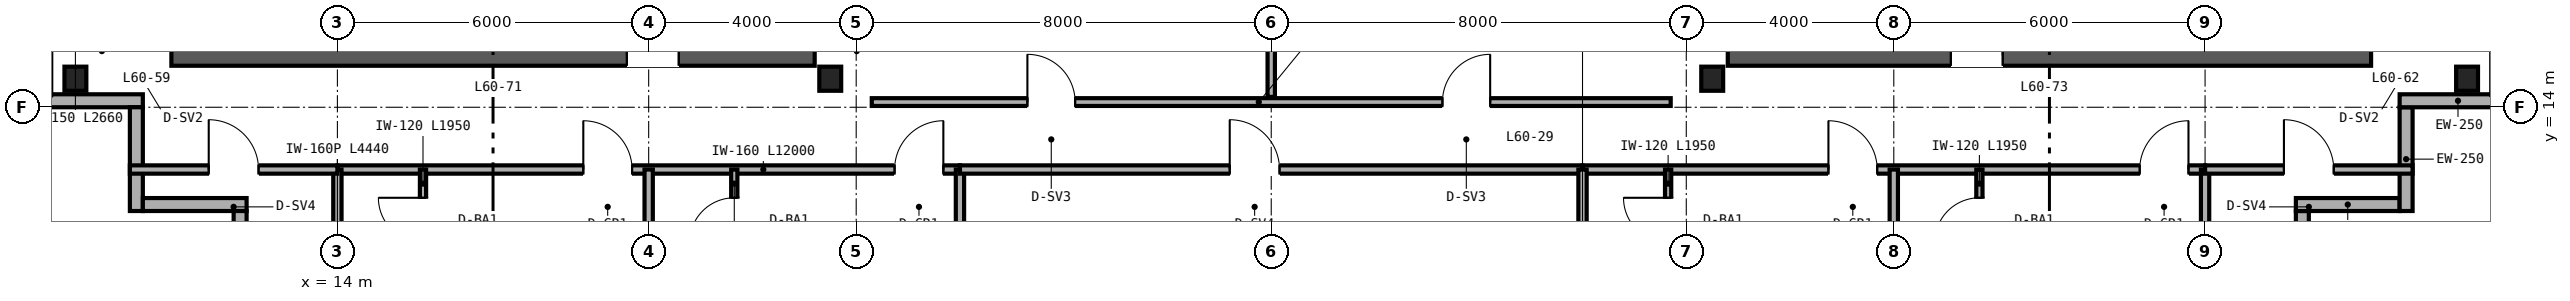
"""IFC4 building model, lengths in metres.
Left out: names, types, materials, properties, quantities, classifications, styles, units other than length and angle.
Written with IfcOpenShell. Run it as: python <this file> out.ifc"""

import sys

from ifc_helpers import new_model, si_unit, direction, frame, frame_2d, origin, origin_2d, place, context, subcontext, project, spatial, rectangle, i_section, extrude, source, transform, mapped, element, fill, save


model = new_model("IFC4")
c1 = context("Model", 3, precision=1e-05, world=origin(), true_north=direction((0.0, 1.0)))
c2 = subcontext(c1, "Body", "Model", "MODEL_VIEW")
j1 = project(units=[si_unit("LENGTHUNIT", "METRE"), si_unit("PLANEANGLEUNIT", "RADIAN")], contexts=[c1])
p1 = place(None, origin())
s1 = spatial("IfcSite", under=j1, at=p1, CompositionType="ELEMENT")
p2 = place(p1, origin())
s2 = spatial("IfcBuilding", under=s1, at=p2, CompositionType="ELEMENT")
p3 = place(p2, frame((0.0, 0.0, 240.0)))
s3 = spatial("IfcBuildingStorey", under=s2, at=p3, CompositionType="ELEMENT", Elevation=240.0)
p4 = place(p3, frame((10.8, 15.0, 0.0), z_axis=(0.0, 0.0, 1.0), x_axis=(1.0, 0.0, 0.0)))
e1 = element("IfcWall", 1, at=p4, inside=s3, PredefinedType="SHEAR", context=c2, shape_type="SweptSolid", body=[
    extrude(rectangle(XDim=12.4, YDim=0.4, at=frame_2d((6.2, 0.0))), origin(), (0.0, 0.0, 1.0), 3.38),
])
p5 = place(p4, frame((8.78, 0.0, 0.0)))
e2 = element("IfcOpeningElement", 2, at=p5, cuts=e1, PredefinedType="OPENING", context=c2, shape_type="SweptSolid", body=[
    extrude(rectangle(XDim=1.0, YDim=2.15, at=frame_2d((0.5, 1.075))), frame((0.0, 0.21, 0.0), z_axis=(0.0, -1.0, 0.0), x_axis=(1.0, 0.0, 0.0)), (0.0, 0.0, 1.0), 0.42),
])
p6 = place(p3, frame((40.8, 15.0, 0.0), z_axis=(0.0, 0.0, 1.0), x_axis=(1.0, 0.0, 0.0)))
e3 = element("IfcWall", 3, at=p6, inside=s3, PredefinedType="SHEAR", context=c2, shape_type="SweptSolid", body=[
    extrude(rectangle(XDim=12.4, YDim=0.4, at=frame_2d((6.2, 0.0))), origin(), (0.0, 0.0, 1.0), 3.38),
])
p7 = place(p6, frame((4.3, 0.0, 0.0)))
e4 = element("IfcOpeningElement", 4, at=p7, cuts=e3, PredefinedType="OPENING", context=c2, shape_type="SweptSolid", body=[
    extrude(rectangle(XDim=1.0, YDim=2.15, at=frame_2d((0.5, 1.075))), frame((0.0, 0.21, 0.0), z_axis=(0.0, -1.0, 0.0), x_axis=(1.0, 0.0, 0.0)), (0.0, 0.0, 1.0), 0.42),
])
m1 = source(origin(), c2, "Body", "SweptSolid", [
    extrude(i_section(OverallWidth=0.422, OverallDepth=0.465, WebThickness=0.045, FlangeThickness=0.073, FilletRadius=0.025, at=origin_2d()), origin(), (0.0, 0.0, 1.0), 3.38),
])
for number, where, z_axis, x_axis in (
    (5, (8.95, 14.55, 0.0), (0.0, 0.0, 1.0), (1.0, 0.0, 0.0)),
    (6, (23.5, 14.55, 0.0), (0.0, 0.0, 1.0), (1.0, 0.0, 0.0)),
    (7, (40.5, 14.55, 0.0), (0.0, 0.0, 1.0), (1.0, 0.0, 0.0)),
    (8, (55.05, 14.55, 0.0), (0.0, 0.0, 1.0), (1.0, 0.0, 0.0)),
):
    element("IfcColumn", number, at=place(p3, frame(where, z_axis=z_axis, x_axis=x_axis)), inside=s3, PredefinedType="COLUMN", context=c2, shape_type="MappedRepresentation", body=[
        mapped(m1, transform((0.0, 0.0, 0.0), scale=1.0)),
    ])
p8 = place(p3, frame((51.875, 10.0, 0.0), z_axis=(0.0, 0.0, 1.0), x_axis=(0.0, 1.0, 0.0)))
e9 = element("IfcWall", 9, at=p8, inside=s3, PredefinedType="SOLIDWALL", context=c2, shape_type="SweptSolid", body=[
    extrude(rectangle(XDim=2.0, YDim=0.25, at=frame_2d((1.0, 0.0))), origin(), (0.0, 0.0, 1.0), 3.38),
])
p9 = place(p8, frame((0.5, 0.0, 0.85)))
e10 = element("IfcOpeningElement", 10, at=p9, cuts=e9, PredefinedType="OPENING", context=c2, shape_type="SweptSolid", body=[
    extrude(rectangle(XDim=1.0, YDim=1.9, at=frame_2d((0.5, 0.95))), frame((0.0, 0.135, 0.0), z_axis=(0.0, -1.0, 0.0), x_axis=(1.0, 0.0, 0.0)), (0.0, 0.0, 1.0), 0.27),
])
for number, where, z_axis, x_axis in (
    (11, (51.75, 12.125, 0.0), (0.0, 0.0, 1.0), (1.0, 0.0, 0.0)),
    (12, (53.875, 12.0, 0.0), (0.0, 0.0, 1.0), (0.0, 1.0, 0.0)),
):
    element("IfcWall", number, at=place(p3, frame(where, z_axis=z_axis, x_axis=x_axis)), inside=s3, PredefinedType="SOLIDWALL", context=c2, shape_type="SweptSolid", body=[
        extrude(rectangle(XDim=2.0, YDim=0.25, at=frame_2d((1.0, 0.0))), origin(), (0.0, 0.0, 1.0), 3.38),
    ])
for number, where, z_axis, x_axis in (
    (13, (53.75, 14.125, 0.0), (0.0, 0.0, 1.0), (1.0, 0.0, 0.0)),
    (14, (8.0, 14.125, 0.0), (0.0, 0.0, 1.0), (1.0, 0.0, 0.0)),
):
    element("IfcWall", number, at=place(p3, frame(where, z_axis=z_axis, x_axis=x_axis)), inside=s3, PredefinedType="SOLIDWALL", context=c2, shape_type="SweptSolid", body=[
        extrude(rectangle(XDim=2.25, YDim=0.25, at=frame_2d((1.125, 0.0))), origin(), (0.0, 0.0, 1.0), 3.38),
    ])
for number, where, z_axis, x_axis in (
    (15, (10.125, 14.0, 0.0), (0.0, 0.0, 1.0), (0.0, -1.0, 0.0)),
    (16, (10.25, 12.125, 0.0), (0.0, 0.0, 1.0), (1.0, 0.0, 0.0)),
    (17, (12.125, 12.0, 0.0), (0.0, 0.0, 1.0), (0.0, -1.0, 0.0)),
):
    element("IfcWall", number, at=place(p3, frame(where, z_axis=z_axis, x_axis=x_axis)), inside=s3, PredefinedType="SOLIDWALL", context=c2, shape_type="SweptSolid", body=[
        extrude(rectangle(XDim=2.0, YDim=0.25, at=frame_2d((1.0, 0.0))), origin(), (0.0, 0.0, 1.0), 3.38),
    ])
p10 = place(p3, frame((32.0, 14.2, 0.0), z_axis=(0.0, 0.0, 1.0), x_axis=(0.0, 1.0, 0.0)))
e18 = element("IfcWall", 18, at=p10, inside=s3, PredefinedType="PARTITIONING", context=c2, shape_type="SweptSolid", body=[
    extrude(rectangle(XDim=2.65, YDim=0.142, at=frame_2d((1.325, 0.0))), origin(), (0.0, 0.0, 1.0), 3.38),
])
p11 = place(p3, frame((24.3, 14.1, 0.0), z_axis=(0.0, 0.0, 1.0), x_axis=(1.0, 0.0, 0.0)))
e19 = element("IfcWall", 19, at=p11, inside=s3, PredefinedType="PARTITIONING", context=c2, shape_type="SweptSolid", body=[
    extrude(rectangle(XDim=15.4, YDim=0.15, at=frame_2d((7.7, 0.0))), origin(), (0.0, 0.0, 1.0), 3.38),
])
p12 = place(p11, frame((3.0, 0.0, 0.0)))
e20 = element("IfcOpeningElement", 20, at=p12, cuts=e19, PredefinedType="OPENING", context=c2, shape_type="SweptSolid", body=[
    extrude(rectangle(XDim=0.92, YDim=2.15, at=frame_2d((0.46, 1.075))), frame((0.0, 0.085, 0.0), z_axis=(0.0, -1.0, 0.0), x_axis=(1.0, 0.0, 0.0)), (0.0, 0.0, 1.0), 0.17),
])
p13 = place(p11, frame((11.0, 0.0, 0.0)))
e21 = element("IfcOpeningElement", 21, at=p13, cuts=e19, PredefinedType="OPENING", context=c2, shape_type="SweptSolid", body=[
    extrude(rectangle(XDim=0.92, YDim=2.15, at=frame_2d((0.46, 1.075))), frame((0.0, 0.085, 0.0), z_axis=(0.0, -1.0, 0.0), x_axis=(1.0, 0.0, 0.0)), (0.0, 0.0, 1.0), 0.17),
])
p14 = place(p3, frame((14.0, 12.8, 0.0), z_axis=(0.0, 0.0, 1.0), x_axis=(1.0, 0.0, 0.0)))
e22 = element("IfcWall", 22, at=p14, inside=s3, PredefinedType="PARTITIONING", context=c2, shape_type="SweptSolid", body=[
    extrude(rectangle(XDim=12.0, YDim=0.16, at=frame_2d((6.0, 0.0))), origin(), (0.0, 0.0, 1.0), 2.923),
])
p15 = place(p14, frame((4.74, 0.0, 0.0)))
e23 = element("IfcOpeningElement", 23, at=p15, cuts=e22, PredefinedType="OPENING", context=c2, shape_type="SweptSolid", body=[
    extrude(rectangle(XDim=0.94, YDim=2.15, at=frame_2d((0.47, 1.075))), frame((0.0, 0.09, 0.0), z_axis=(0.0, -1.0, 0.0), x_axis=(1.0, 0.0, 0.0)), (0.0, 0.0, 1.0), 0.18),
])
p16 = place(p14, frame((10.74, 0.0, 0.0)))
e24 = element("IfcOpeningElement", 24, at=p16, cuts=e22, PredefinedType="OPENING", context=c2, shape_type="SweptSolid", body=[
    extrude(rectangle(XDim=0.94, YDim=2.15, at=frame_2d((0.47, 1.075))), frame((0.0, 0.09, 0.0), z_axis=(0.0, -1.0, 0.0), x_axis=(1.0, 0.0, 0.0)), (0.0, 0.0, 1.0), 0.18),
])
p17 = place(p3, frame((14.0, 8.36, 0.0), z_axis=(0.0, 0.0, 1.0), x_axis=(0.0, 1.0, 0.0)))
e25 = element("IfcWall", 25, at=p17, inside=s3, PredefinedType="PARTITIONING", context=c2, shape_type="SweptSolid", body=[
    extrude(rectangle(XDim=4.44, YDim=0.16, at=frame_2d((2.22, 0.0))), origin(), (0.0, 0.0, 1.0), 2.687),
])
p18 = place(p3, frame((26.0, 8.36, 0.0), z_axis=(0.0, 0.0, 1.0), x_axis=(0.0, 1.0, 0.0)))
e26 = element("IfcWall", 26, at=p18, inside=s3, PredefinedType="PARTITIONING", context=c2, shape_type="SweptSolid", body=[
    extrude(rectangle(XDim=4.44, YDim=0.16, at=frame_2d((2.22, 0.0))), origin(), (0.0, 0.0, 1.0), 2.453),
])
p19 = place(p3, frame((20.0, 8.36, 0.0), z_axis=(0.0, 0.0, 1.0), x_axis=(0.0, 1.0, 0.0)))
e27 = element("IfcWall", 27, at=p19, inside=s3, PredefinedType="PARTITIONING", context=c2, shape_type="SweptSolid", body=[
    extrude(rectangle(XDim=4.44, YDim=0.16, at=frame_2d((2.22, 0.0))), origin(), (0.0, 0.0, 1.0), 2.687),
])
p20 = place(p3, frame((15.65, 10.85, 0.0), z_axis=(0.0, 0.0, 1.0), x_axis=(0.0, 1.0, 0.0)))
e28 = element("IfcWall", 28, at=p20, inside=s3, PredefinedType="PARTITIONING", context=c2, shape_type="SweptSolid", body=[
    extrude(rectangle(XDim=1.95, YDim=0.12, at=frame_2d((0.975, 0.0))), origin(), (0.0, 0.0, 1.0), 3.38),
])
p21 = place(p20, frame((0.545, 0.0, 0.0)))
e29 = element("IfcOpeningElement", 29, at=p21, cuts=e28, PredefinedType="OPENING", context=c2, shape_type="SweptSolid", body=[
    extrude(rectangle(XDim=0.86, YDim=2.1, at=frame_2d((0.43, 1.05))), frame((0.0, 0.07, 0.0), z_axis=(0.0, -1.0, 0.0), x_axis=(1.0, 0.0, 0.0)), (0.0, 0.0, 1.0), 0.14),
])
p22 = place(p3, frame((21.65, 10.85, 0.0), z_axis=(0.0, 0.0, 1.0), x_axis=(0.0, 1.0, 0.0)))
e30 = element("IfcWall", 30, at=p22, inside=s3, PredefinedType="PARTITIONING", context=c2, shape_type="SweptSolid", body=[
    extrude(rectangle(XDim=1.95, YDim=0.12, at=frame_2d((0.975, 0.0))), origin(), (0.0, 0.0, 1.0), 3.38),
])
p23 = place(p22, frame((0.545, 0.0, 0.0)))
e31 = element("IfcOpeningElement", 31, at=p23, cuts=e30, PredefinedType="OPENING", context=c2, shape_type="SweptSolid", body=[
    extrude(rectangle(XDim=0.86, YDim=2.1, at=frame_2d((0.43, 1.05))), frame((0.0, 0.07, 0.0), z_axis=(0.0, -1.0, 0.0), x_axis=(1.0, 0.0, 0.0)), (0.0, 0.0, 1.0), 0.14),
])
p24 = place(p3, frame((26.0, 12.8, 0.0), z_axis=(0.0, 0.0, 1.0), x_axis=(1.0, 0.0, 0.0)))
e32 = element("IfcWall", 32, at=p24, inside=s3, PredefinedType="PARTITIONING", context=c2, shape_type="SweptSolid", body=[
    extrude(rectangle(XDim=12.0, YDim=0.16, at=frame_2d((6.0, 0.0))), origin(), (0.0, 0.0, 1.0), 3.38),
])
p25 = place(p24, frame((5.2, 0.0, 0.0)))
e33 = element("IfcOpeningElement", 33, at=p25, cuts=e32, PredefinedType="OPENING", context=c2, shape_type="SweptSolid", body=[
    extrude(rectangle(XDim=0.96, YDim=2.15, at=frame_2d((0.48, 1.075))), frame((0.0, 0.09, 0.0), z_axis=(0.0, -1.0, 0.0), x_axis=(1.0, 0.0, 0.0)), (0.0, 0.0, 1.0), 0.18),
])
p26 = place(p3, frame((38.0, 12.8, 0.0), z_axis=(0.0, 0.0, 1.0), x_axis=(1.0, 0.0, 0.0)))
e34 = element("IfcWall", 34, at=p26, inside=s3, PredefinedType="PARTITIONING", context=c2, shape_type="SweptSolid", body=[
    extrude(rectangle(XDim=12.0, YDim=0.16, at=frame_2d((6.0, 0.0))), origin(), (0.0, 0.0, 1.0), 2.923),
])
p27 = place(p26, frame((4.74, 0.0, 0.0)))
e35 = element("IfcOpeningElement", 35, at=p27, cuts=e34, PredefinedType="OPENING", context=c2, shape_type="SweptSolid", body=[
    extrude(rectangle(XDim=0.94, YDim=2.15, at=frame_2d((0.47, 1.075))), frame((0.0, 0.09, 0.0), z_axis=(0.0, -1.0, 0.0), x_axis=(1.0, 0.0, 0.0)), (0.0, 0.0, 1.0), 0.18),
])
p28 = place(p26, frame((10.74, 0.0, 0.0)))
e36 = element("IfcOpeningElement", 36, at=p28, cuts=e34, PredefinedType="OPENING", context=c2, shape_type="SweptSolid", body=[
    extrude(rectangle(XDim=0.94, YDim=2.15, at=frame_2d((0.47, 1.075))), frame((0.0, 0.09, 0.0), z_axis=(0.0, -1.0, 0.0), x_axis=(1.0, 0.0, 0.0)), (0.0, 0.0, 1.0), 0.18),
])
p29 = place(p3, frame((38.0, 8.36, 0.0), z_axis=(0.0, 0.0, 1.0), x_axis=(0.0, 1.0, 0.0)))
e37 = element("IfcWall", 37, at=p29, inside=s3, PredefinedType="PARTITIONING", context=c2, shape_type="SweptSolid", body=[
    extrude(rectangle(XDim=4.44, YDim=0.16, at=frame_2d((2.22, 0.0))), origin(), (0.0, 0.0, 1.0), 2.453),
])
for number, where, z_axis, x_axis in (
    (38, (50.0, 8.36, 0.0), (0.0, 0.0, 1.0), (0.0, 1.0, 0.0)),
    (39, (44.0, 8.36, 0.0), (0.0, 0.0, 1.0), (0.0, 1.0, 0.0)),
):
    element("IfcWall", number, at=place(p3, frame(where, z_axis=z_axis, x_axis=x_axis)), inside=s3, PredefinedType="PARTITIONING", context=c2, shape_type="SweptSolid", body=[
        extrude(rectangle(XDim=4.44, YDim=0.16, at=frame_2d((2.22, 0.0))), origin(), (0.0, 0.0, 1.0), 2.687),
    ])
p30 = place(p3, frame((39.65, 10.85, 0.0), z_axis=(0.0, 0.0, 1.0), x_axis=(0.0, 1.0, 0.0)))
e40 = element("IfcWall", 40, at=p30, inside=s3, PredefinedType="PARTITIONING", context=c2, shape_type="SweptSolid", body=[
    extrude(rectangle(XDim=1.95, YDim=0.12, at=frame_2d((0.975, 0.0))), origin(), (0.0, 0.0, 1.0), 3.38),
])
p31 = place(p30, frame((0.545, 0.0, 0.0)))
e41 = element("IfcOpeningElement", 41, at=p31, cuts=e40, PredefinedType="OPENING", context=c2, shape_type="SweptSolid", body=[
    extrude(rectangle(XDim=0.86, YDim=2.1, at=frame_2d((0.43, 1.05))), frame((0.0, 0.07, 0.0), z_axis=(0.0, -1.0, 0.0), x_axis=(1.0, 0.0, 0.0)), (0.0, 0.0, 1.0), 0.14),
])
p32 = place(p3, frame((45.65, 10.85, 0.0), z_axis=(0.0, 0.0, 1.0), x_axis=(0.0, 1.0, 0.0)))
e42 = element("IfcWall", 42, at=p32, inside=s3, PredefinedType="PARTITIONING", context=c2, shape_type="SweptSolid", body=[
    extrude(rectangle(XDim=1.95, YDim=0.12, at=frame_2d((0.975, 0.0))), origin(), (0.0, 0.0, 1.0), 3.38),
])
p33 = place(p32, frame((0.545, 0.0, 0.0)))
e43 = element("IfcOpeningElement", 43, at=p33, cuts=e42, PredefinedType="OPENING", context=c2, shape_type="SweptSolid", body=[
    extrude(rectangle(XDim=0.86, YDim=2.1, at=frame_2d((0.43, 1.05))), frame((0.0, 0.07, 0.0), z_axis=(0.0, -1.0, 0.0), x_axis=(1.0, 0.0, 0.0)), (0.0, 0.0, 1.0), 0.14),
])
p34 = place(p3, frame((10.0, 12.8, 0.0), z_axis=(0.0, 0.0, 1.0), x_axis=(1.0, 0.0, 0.0)))
e44 = element("IfcWall", 44, at=p34, inside=s3, PredefinedType="PARTITIONING", context=c2, shape_type="SweptSolid", body=[
    extrude(rectangle(XDim=4.0, YDim=0.16, at=frame_2d((2.0, 0.0))), origin(), (0.0, 0.0, 1.0), 3.38),
])
p35 = place(p34, frame((1.52, 0.0, 0.0)))
e45 = element("IfcOpeningElement", 45, at=p35, cuts=e44, PredefinedType="OPENING", context=c2, shape_type="SweptSolid", body=[
    extrude(rectangle(XDim=0.96, YDim=2.15, at=frame_2d((0.48, 1.075))), frame((0.0, 0.09, 0.0), z_axis=(0.0, -1.0, 0.0), x_axis=(1.0, 0.0, 0.0)), (0.0, 0.0, 1.0), 0.18),
])
p36 = place(p3, frame((50.0, 12.8, 0.0), z_axis=(0.0, 0.0, 1.0), x_axis=(1.0, 0.0, 0.0)))
e46 = element("IfcWall", 46, at=p36, inside=s3, PredefinedType="PARTITIONING", context=c2, shape_type="SweptSolid", body=[
    extrude(rectangle(XDim=4.0, YDim=0.16, at=frame_2d((2.0, 0.0))), origin(), (0.0, 0.0, 1.0), 3.38),
])
p37 = place(p36, frame((1.52, 0.0, 0.0)))
e47 = element("IfcOpeningElement", 47, at=p37, cuts=e46, PredefinedType="OPENING", context=c2, shape_type="SweptSolid", body=[
    extrude(rectangle(XDim=0.96, YDim=2.15, at=frame_2d((0.48, 1.075))), frame((0.0, 0.09, 0.0), z_axis=(0.0, -1.0, 0.0), x_axis=(1.0, 0.0, 0.0)), (0.0, 0.0, 1.0), 0.18),
])
m2 = source(origin(), c2, "Body", "SweptSolid", [
    extrude(rectangle(XDim=1.0, YDim=2.15, at=frame_2d((0.5, 1.075))), frame((0.0, 0.025, 0.0), z_axis=(0.0, -1.0, 0.0), x_axis=(1.0, 0.0, 0.0)), (0.0, 0.0, 1.0), 0.05),
])
p38 = place(p5, origin())
e48 = element("IfcDoor", 48, at=p38, inside=s3, OperationType="SINGLE_SWING_LEFT", PredefinedType="DOOR", context=c2, shape_type="MappedRepresentation", body=[
    mapped(m2, transform((0.0, 0.0, 0.0), scale=1.0)),
])
fill(e2, e48)
p39 = place(p7, origin())
e49 = element("IfcDoor", 49, at=p39, inside=s3, OperationType="SINGLE_SWING_RIGHT", PredefinedType="DOOR", context=c2, shape_type="MappedRepresentation", body=[
    mapped(m2, transform((0.0, 0.0, 0.0), scale=1.0)),
])
fill(e4, e49)
m3 = source(origin(), c2, "Body", "SweptSolid", [
    extrude(rectangle(XDim=0.92, YDim=2.15, at=frame_2d((0.46, 1.075))), frame((0.0, 0.025, 0.0), z_axis=(0.0, -1.0, 0.0), x_axis=(1.0, 0.0, 0.0)), (0.0, 0.0, 1.0), 0.05),
])
p40 = place(p12, origin())
e50 = element("IfcDoor", 50, at=p40, inside=s3, OperationType="SINGLE_SWING_LEFT", PredefinedType="DOOR", context=c2, shape_type="MappedRepresentation", body=[
    mapped(m3, transform((0.0, 0.0, 0.0), scale=1.0)),
])
fill(e20, e50)
p41 = place(p13, origin())
e51 = element("IfcDoor", 51, at=p41, inside=s3, OperationType="SINGLE_SWING_RIGHT", PredefinedType="DOOR", context=c2, shape_type="MappedRepresentation", body=[
    mapped(m3, transform((0.0, 0.0, 0.0), scale=1.0)),
])
fill(e21, e51)
m4 = source(origin(), c2, "Body", "SweptSolid", [
    extrude(rectangle(XDim=0.86, YDim=2.1, at=frame_2d((0.43, 1.05))), frame((0.0, 0.025, 0.0), z_axis=(0.0, -1.0, 0.0), x_axis=(1.0, 0.0, 0.0)), (0.0, 0.0, 1.0), 0.05),
])
p42 = place(p21, origin())
e52 = element("IfcDoor", 52, at=p42, inside=s3, OperationType="SINGLE_SWING_RIGHT", PredefinedType="DOOR", context=c2, shape_type="MappedRepresentation", body=[
    mapped(m4, transform((0.0, 0.0, 0.0), scale=1.0)),
])
fill(e29, e52)
p43 = place(p23, origin())
e53 = element("IfcDoor", 53, at=p43, inside=s3, OperationType="SINGLE_SWING_LEFT", PredefinedType="DOOR", context=c2, shape_type="MappedRepresentation", body=[
    mapped(m4, transform((0.0, 0.0, 0.0), scale=1.0)),
])
fill(e31, e53)
m5 = source(origin(), c2, "Body", "SweptSolid", [
    extrude(rectangle(XDim=0.94, YDim=2.15, at=frame_2d((0.47, 1.075))), frame((0.0, 0.025, 0.0), z_axis=(0.0, -1.0, 0.0), x_axis=(1.0, 0.0, 0.0)), (0.0, 0.0, 1.0), 0.05),
])
p44 = place(p15, origin())
e54 = element("IfcDoor", 54, at=p44, inside=s3, OperationType="SINGLE_SWING_LEFT", PredefinedType="DOOR", context=c2, shape_type="MappedRepresentation", body=[
    mapped(m5, transform((0.0, 0.0, 0.0), scale=1.0)),
])
fill(e23, e54)
p45 = place(p16, origin())
e55 = element("IfcDoor", 55, at=p45, inside=s3, OperationType="SINGLE_SWING_RIGHT", PredefinedType="DOOR", context=c2, shape_type="MappedRepresentation", body=[
    mapped(m5, transform((0.0, 0.0, 0.0), scale=1.0)),
])
fill(e24, e55)
m6 = source(origin(), c2, "Body", "SweptSolid", [
    extrude(rectangle(XDim=0.96, YDim=2.15, at=frame_2d((0.48, 1.075))), frame((0.0, 0.025, 0.0), z_axis=(0.0, -1.0, 0.0), x_axis=(1.0, 0.0, 0.0)), (0.0, 0.0, 1.0), 0.05),
])
p46 = place(p25, origin())
e56 = element("IfcDoor", 56, at=p46, inside=s3, OperationType="SINGLE_SWING_LEFT", PredefinedType="DOOR", context=c2, shape_type="MappedRepresentation", body=[
    mapped(m6, transform((0.0, 0.0, 0.0), scale=1.0)),
])
fill(e33, e56)
p47 = place(p31, origin())
e57 = element("IfcDoor", 57, at=p47, inside=s3, OperationType="SINGLE_SWING_RIGHT", PredefinedType="DOOR", context=c2, shape_type="MappedRepresentation", body=[
    mapped(m4, transform((0.0, 0.0, 0.0), scale=1.0)),
])
fill(e41, e57)
p48 = place(p33, origin())
e58 = element("IfcDoor", 58, at=p48, inside=s3, OperationType="SINGLE_SWING_LEFT", PredefinedType="DOOR", context=c2, shape_type="MappedRepresentation", body=[
    mapped(m4, transform((0.0, 0.0, 0.0), scale=1.0)),
])
fill(e43, e58)
p49 = place(p27, origin())
e59 = element("IfcDoor", 59, at=p49, inside=s3, OperationType="SINGLE_SWING_LEFT", PredefinedType="DOOR", context=c2, shape_type="MappedRepresentation", body=[
    mapped(m5, transform((0.0, 0.0, 0.0), scale=1.0)),
])
fill(e35, e59)
p50 = place(p28, origin())
e60 = element("IfcDoor", 60, at=p50, inside=s3, OperationType="SINGLE_SWING_RIGHT", PredefinedType="DOOR", context=c2, shape_type="MappedRepresentation", body=[
    mapped(m5, transform((0.0, 0.0, 0.0), scale=1.0)),
])
fill(e36, e60)
p51 = place(p35, origin())
e61 = element("IfcDoor", 61, at=p51, inside=s3, OperationType="SINGLE_SWING_LEFT", PredefinedType="DOOR", context=c2, shape_type="MappedRepresentation", body=[
    mapped(m6, transform((0.0, 0.0, 0.0), scale=1.0)),
])
fill(e45, e61)
p52 = place(p37, origin())
e62 = element("IfcDoor", 62, at=p52, inside=s3, OperationType="SINGLE_SWING_LEFT", PredefinedType="DOOR", context=c2, shape_type="MappedRepresentation", body=[
    mapped(m6, transform((0.0, 0.0, 0.0), scale=1.0)),
])
fill(e47, e62)
save(model, sys.argv[1])
